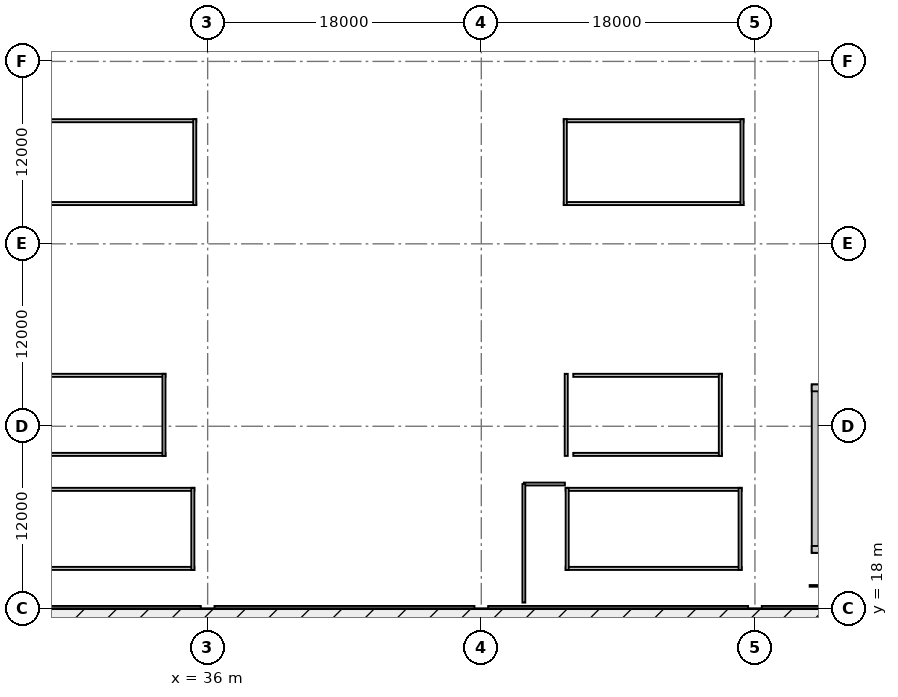
"""IFC4 building model, lengths in metres.
Left out: names, types, materials, properties, quantities, classifications, styles, units other than length and angle.
Written with IfcOpenShell. Run it as: python <this file> out.ifc"""

import sys

from ifc_helpers import new_model, si_unit, direction, frame, frame_2d, origin, origin_2d, place, context, subcontext, project, spatial, rectangle, circle, extrude, element, fill, save


model = new_model("IFC4")
c1 = context("Model", 3, precision=1e-05, world=origin(), true_north=direction((0.0, 1.0)))
c2 = subcontext(c1, "Body", "Model", "MODEL_VIEW")
j1 = project(units=[si_unit("LENGTHUNIT", "METRE"), si_unit("PLANEANGLEUNIT", "RADIAN")], contexts=[c1])
p1 = place(None, origin())
s1 = spatial("IfcSite", under=j1, at=p1, CompositionType="ELEMENT")
p2 = place(p1, origin())
s2 = spatial("IfcBuilding", under=s1, at=p2, CompositionType="ELEMENT")
p3 = place(p2, origin())
s3 = spatial("IfcBuildingStorey", under=s2, at=p3, CompositionType="ELEMENT", Elevation=0.0)
for number, where, z_axis, x_axis in (
    (1, (36.0, 18.0, 0.0), (0.0, 0.0, 1.0), (1.0, 0.0, 0.0)),
    (2, (36.0, 30.0, 0.0), (0.0, 0.0, 1.0), (1.0, 0.0, 0.0)),
    (3, (36.0, 36.0, 0.0), (0.0, 0.0, 1.0), (1.0, 0.0, 0.0)),
    (4, (36.0, 42.0, 0.0), (0.0, 0.0, 1.0), (1.0, 0.0, 0.0)),
    (5, (36.0, 54.0, 0.0), (0.0, 0.0, 1.0), (1.0, 0.0, 0.0)),
    (6, (54.0, 18.0, 0.0), (0.0, 0.0, 1.0), (1.0, 0.0, 0.0)),
    (7, (54.0, 30.0, 0.0), (0.0, 0.0, 1.0), (1.0, 0.0, 0.0)),
    (8, (54.0, 36.0, 0.0), (0.0, 0.0, 1.0), (1.0, 0.0, 0.0)),
    (9, (54.0, 42.0, 0.0), (0.0, 0.0, 1.0), (1.0, 0.0, 0.0)),
    (10, (54.0, 54.0, 0.0), (0.0, 0.0, 1.0), (1.0, 0.0, 0.0)),
    (11, (72.0, 18.0, 0.0), (0.0, 0.0, 1.0), (1.0, 0.0, 0.0)),
    (12, (72.0, 30.0, 0.0), (0.0, 0.0, 1.0), (1.0, 0.0, 0.0)),
    (13, (72.0, 36.0, 0.0), (0.0, 0.0, 1.0), (1.0, 0.0, 0.0)),
    (14, (72.0, 42.0, 0.0), (0.0, 0.0, 1.0), (1.0, 0.0, 0.0)),
    (15, (72.0, 54.0, 0.0), (0.0, 0.0, 1.0), (1.0, 0.0, 0.0)),
):
    element("IfcColumn", number, at=place(p3, frame(where, z_axis=z_axis, x_axis=x_axis)), inside=s3, PredefinedType="COLUMN", context=c2, shape_type="SweptSolid", body=[
        extrude(circle(Radius=0.45, at=origin_2d()), origin(), (0.0, 0.0, 1.0), 6.6),
    ])
p4 = place(p3, frame((35.55, 18.0, 0.0), z_axis=(0.0, 0.0, 1.0), x_axis=(-1.0, 0.0, 0.0)))
e16 = element("IfcWall", 16, at=p4, inside=s3, PredefinedType="SOLIDWALL", context=c2, shape_type="SweptSolid", body=[
    extrude(rectangle(XDim=17.1, YDim=0.36, at=frame_2d((8.55, 0.0))), origin(), (0.0, 0.0, 1.0), 5.595),
])
p5 = place(p4, frame((3.25, 0.0, 0.0)))
e17 = element("IfcOpeningElement", 17, at=p5, cuts=e16, PredefinedType="OPENING", context=c2, shape_type="SweptSolid", body=[
    extrude(rectangle(XDim=2.4, YDim=2.5, at=frame_2d((1.2, 1.25))), frame((0.0, 0.19, 0.0), z_axis=(0.0, -1.0, 0.0), x_axis=(1.0, 0.0, 0.0)), (0.0, 0.0, 1.0), 0.38),
])
p6 = place(p4, frame((7.35, 0.0, 0.0)))
e18 = element("IfcOpeningElement", 18, at=p6, cuts=e16, PredefinedType="OPENING", context=c2, shape_type="SweptSolid", body=[
    extrude(rectangle(XDim=2.4, YDim=2.5, at=frame_2d((1.2, 1.25))), frame((0.0, 0.19, 0.0), z_axis=(0.0, -1.0, 0.0), x_axis=(1.0, 0.0, 0.0)), (0.0, 0.0, 1.0), 0.38),
])
p7 = place(p4, frame((11.15, 0.0, 0.95)))
e19 = element("IfcOpeningElement", 19, at=p7, cuts=e16, PredefinedType="OPENING", context=c2, shape_type="SweptSolid", body=[
    extrude(rectangle(XDim=3.0, YDim=2.1, at=frame_2d((1.5, 1.05))), frame((0.0, 0.19, 0.0), z_axis=(0.0, -1.0, 0.0), x_axis=(1.0, 0.0, 0.0)), (0.0, 0.0, 1.0), 0.38),
])
p8 = place(p3, frame((53.55, 18.0, 0.0), z_axis=(0.0, 0.0, 1.0), x_axis=(-1.0, 0.0, 0.0)))
e20 = element("IfcWall", 20, at=p8, inside=s3, PredefinedType="SOLIDWALL", context=c2, shape_type="SweptSolid", body=[
    extrude(rectangle(XDim=17.1, YDim=0.36, at=frame_2d((8.55, 0.0))), origin(), (0.0, 0.0, 1.0), 5.595),
])
p9 = place(p8, frame((3.25, 0.0, 0.0)))
e21 = element("IfcOpeningElement", 21, at=p9, cuts=e20, PredefinedType="OPENING", context=c2, shape_type="SweptSolid", body=[
    extrude(rectangle(XDim=2.4, YDim=2.5, at=frame_2d((1.2, 1.25))), frame((0.0, 0.19, 0.0), z_axis=(0.0, -1.0, 0.0), x_axis=(1.0, 0.0, 0.0)), (0.0, 0.0, 1.0), 0.38),
])
p10 = place(p8, frame((7.45, 0.0, 0.0)))
e22 = element("IfcOpeningElement", 22, at=p10, cuts=e20, PredefinedType="OPENING", context=c2, shape_type="SweptSolid", body=[
    extrude(rectangle(XDim=2.2, YDim=2.45, at=frame_2d((1.1, 1.225))), frame((0.0, 0.19, 0.0), z_axis=(0.0, -1.0, 0.0), x_axis=(1.0, 0.0, 0.0)), (0.0, 0.0, 1.0), 0.38),
])
p11 = place(p8, frame((11.3, 0.0, 0.95)))
e23 = element("IfcOpeningElement", 23, at=p11, cuts=e20, PredefinedType="OPENING", context=c2, shape_type="SweptSolid", body=[
    extrude(rectangle(XDim=2.7, YDim=2.1, at=frame_2d((1.35, 1.05))), frame((0.0, 0.19, 0.0), z_axis=(0.0, -1.0, 0.0), x_axis=(1.0, 0.0, 0.0)), (0.0, 0.0, 1.0), 0.38),
])
p12 = place(p3, frame((71.55, 18.0, 0.0), z_axis=(0.0, 0.0, 1.0), x_axis=(-1.0, 0.0, 0.0)))
e24 = element("IfcWall", 24, at=p12, inside=s3, PredefinedType="SOLIDWALL", context=c2, shape_type="SweptSolid", body=[
    extrude(rectangle(XDim=17.1, YDim=0.36, at=frame_2d((8.55, 0.0))), origin(), (0.0, 0.0, 1.0), 5.595),
])
p13 = place(p12, frame((3.35, 0.0, 0.0)))
e25 = element("IfcOpeningElement", 25, at=p13, cuts=e24, PredefinedType="OPENING", context=c2, shape_type="SweptSolid", body=[
    extrude(rectangle(XDim=2.2, YDim=2.45, at=frame_2d((1.1, 1.225))), frame((0.0, 0.19, 0.0), z_axis=(0.0, -1.0, 0.0), x_axis=(1.0, 0.0, 0.0)), (0.0, 0.0, 1.0), 0.38),
])
p14 = place(p12, frame((7.55, 0.0, 0.0)))
e26 = element("IfcOpeningElement", 26, at=p14, cuts=e24, PredefinedType="OPENING", context=c2, shape_type="SweptSolid", body=[
    extrude(rectangle(XDim=2.0, YDim=2.4, at=frame_2d((1.0, 1.2))), frame((0.0, 0.19, 0.0), z_axis=(0.0, -1.0, 0.0), x_axis=(1.0, 0.0, 0.0)), (0.0, 0.0, 1.0), 0.38),
])
p15 = place(p12, frame((11.45, 0.0, 0.95)))
e27 = element("IfcOpeningElement", 27, at=p15, cuts=e24, PredefinedType="OPENING", context=c2, shape_type="SweptSolid", body=[
    extrude(rectangle(XDim=2.4, YDim=2.1, at=frame_2d((1.2, 1.05))), frame((0.0, 0.19, 0.0), z_axis=(0.0, -1.0, 0.0), x_axis=(1.0, 0.0, 0.0)), (0.0, 0.0, 1.0), 0.38),
])
p16 = place(p3, frame((89.55, 18.0, 0.0), z_axis=(0.0, 0.0, 1.0), x_axis=(-1.0, 0.0, 0.0)))
e28 = element("IfcWall", 28, at=p16, inside=s3, PredefinedType="SOLIDWALL", context=c2, shape_type="SweptSolid", body=[
    extrude(rectangle(XDim=17.1, YDim=0.36, at=frame_2d((8.55, 0.0))), origin(), (0.0, 0.0, 1.0), 5.595),
])
p17 = place(p16, frame((3.55, 0.0, 0.0)))
e29 = element("IfcOpeningElement", 29, at=p17, cuts=e28, PredefinedType="OPENING", context=c2, shape_type="SweptSolid", body=[
    extrude(rectangle(XDim=1.8, YDim=2.35, at=frame_2d((0.9, 1.175))), frame((0.0, 0.19, 0.0), z_axis=(0.0, -1.0, 0.0), x_axis=(1.0, 0.0, 0.0)), (0.0, 0.0, 1.0), 0.38),
])
p18 = place(p16, frame((7.35, 0.0, 0.0)))
e30 = element("IfcOpeningElement", 30, at=p18, cuts=e28, PredefinedType="OPENING", context=c2, shape_type="SweptSolid", body=[
    extrude(rectangle(XDim=2.4, YDim=2.5, at=frame_2d((1.2, 1.25))), frame((0.0, 0.19, 0.0), z_axis=(0.0, -1.0, 0.0), x_axis=(1.0, 0.0, 0.0)), (0.0, 0.0, 1.0), 0.38),
])
p19 = place(p16, frame((11.6, 0.0, 0.95)))
e31 = element("IfcOpeningElement", 31, at=p19, cuts=e28, PredefinedType="OPENING", context=c2, shape_type="SweptSolid", body=[
    extrude(rectangle(XDim=2.1, YDim=2.0, at=frame_2d((1.05, 1.0))), frame((0.0, 0.19, 0.0), z_axis=(0.0, -1.0, 0.0), x_axis=(1.0, 0.0, 0.0)), (0.0, 0.0, 1.0), 0.38),
])
p20 = place(p3, frame((75.962, 32.75, 0.0), z_axis=(0.0, 0.0, 1.0), x_axis=(0.0, -1.0, 0.0)))
e32 = element("IfcWall", 32, at=p20, inside=s3, PredefinedType="SHEAR", context=c2, shape_type="SweptSolid", body=[
    extrude(rectangle(XDim=11.075, YDim=0.45, at=frame_2d((5.538, 0.0))), origin(), (0.0, 0.0, 1.0), 6.32),
])
p21 = place(p3, frame((80.637, 32.525, 0.0), z_axis=(0.0, 0.0, 1.0), x_axis=(-1.0, 0.0, 0.0)))
e33 = element("IfcWall", 33, at=p21, inside=s3, PredefinedType="SHEAR", context=c2, shape_type="SweptSolid", body=[
    extrude(rectangle(XDim=4.9, YDim=0.45, at=frame_2d((2.45, 0.0))), origin(), (0.0, 0.0, 1.0), 6.32),
])
p22 = place(p3, frame((75.738, 21.9, 0.0), z_axis=(0.0, 0.0, 1.0), x_axis=(1.0, 0.0, 0.0)))
e34 = element("IfcWall", 34, at=p22, inside=s3, PredefinedType="SHEAR", context=c2, shape_type="SweptSolid", body=[
    extrude(rectangle(XDim=4.9, YDim=0.45, at=frame_2d((2.45, 0.0))), origin(), (0.0, 0.0, 1.0), 6.32),
])
p23 = place(p22, frame((1.1, 0.0, 0.0)))
e35 = element("IfcOpeningElement", 35, at=p23, cuts=e34, PredefinedType="OPENING", context=c2, shape_type="SweptSolid", body=[
    extrude(rectangle(XDim=1.3, YDim=2.1, at=frame_2d((0.65, 1.05))), frame((0.0, 0.235, 0.0), z_axis=(0.0, -1.0, 0.0), x_axis=(1.0, 0.0, 0.0)), (0.0, 0.0, 1.0), 0.47),
])
for number, where, z_axis, x_axis in (
    (36, (23.55, 20.65, 0.0), (0.0, 0.0, 1.0), (1.0, 0.0, 0.0)),
    (37, (35.125, 25.85, 0.0), (0.0, 0.0, 1.0), (-1.0, 0.0, 0.0)),
):
    element("IfcWall", number, at=place(p3, frame(where, z_axis=z_axis, x_axis=x_axis)), inside=s3, PredefinedType="SOLIDWALL", context=c2, shape_type="SweptSolid", body=[
        extrude(rectangle(XDim=11.575, YDim=0.2, at=frame_2d((5.788, 0.0))), origin(), (0.0, 0.0, 1.0), 6.32),
    ])
p24 = place(p3, frame((35.025, 20.55, 0.0), z_axis=(0.0, 0.0, 1.0), x_axis=(0.0, 1.0, 0.0)))
e38 = element("IfcWall", 38, at=p24, inside=s3, PredefinedType="SOLIDWALL", context=c2, shape_type="SweptSolid", body=[
    extrude(rectangle(XDim=5.4, YDim=0.2, at=frame_2d((2.7, 0.0))), origin(), (0.0, 0.0, 1.0), 6.32),
])
for number, where, z_axis, x_axis in (
    (39, (59.55, 20.65, 0.0), (0.0, 0.0, 1.0), (1.0, 0.0, 0.0)),
    (40, (71.125, 25.85, 0.0), (0.0, 0.0, 1.0), (-1.0, 0.0, 0.0)),
):
    element("IfcWall", number, at=place(p3, frame(where, z_axis=z_axis, x_axis=x_axis)), inside=s3, PredefinedType="SOLIDWALL", context=c2, shape_type="SweptSolid", body=[
        extrude(rectangle(XDim=11.575, YDim=0.2, at=frame_2d((5.788, 0.0))), origin(), (0.0, 0.0, 1.0), 6.32),
    ])
p25 = place(p3, frame((71.025, 20.55, 0.0), z_axis=(0.0, 0.0, 1.0), x_axis=(0.0, 1.0, 0.0)))
e41 = element("IfcWall", 41, at=p25, inside=s3, PredefinedType="SOLIDWALL", context=c2, shape_type="SweptSolid", body=[
    extrude(rectangle(XDim=5.4, YDim=0.2, at=frame_2d((2.7, 0.0))), origin(), (0.0, 0.0, 1.0), 6.32),
])
p26 = place(p3, frame((59.65, 25.95, 0.0), z_axis=(0.0, 0.0, 1.0), x_axis=(0.0, -1.0, 0.0)))
e42 = element("IfcWall", 42, at=p26, inside=s3, PredefinedType="SOLIDWALL", context=c2, shape_type="SweptSolid", body=[
    extrude(rectangle(XDim=5.4, YDim=0.2, at=frame_2d((2.7, 0.0))), origin(), (0.0, 0.0, 1.0), 4.4),
])
p27 = place(p26, frame((1.9, 0.0, 0.0)))
e43 = element("IfcOpeningElement", 43, at=p27, cuts=e42, PredefinedType="OPENING", context=c2, shape_type="SweptSolid", body=[
    extrude(rectangle(XDim=1.6, YDim=2.15, at=frame_2d((0.8, 1.075))), frame((0.0, 0.11, 0.0), z_axis=(0.0, -1.0, 0.0), x_axis=(1.0, 0.0, 0.0)), (0.0, 0.0, 1.0), 0.22),
])
for number, where, z_axis, x_axis in (
    (44, (23.425, 44.65, 0.0), (0.0, 0.0, 1.0), (1.0, 0.0, 0.0)),
    (45, (35.25, 50.1, 0.0), (0.0, 0.0, 1.0), (-1.0, 0.0, 0.0)),
):
    element("IfcWall", number, at=place(p3, frame(where, z_axis=z_axis, x_axis=x_axis)), inside=s3, PredefinedType="SOLIDWALL", context=c2, shape_type="SweptSolid", body=[
        extrude(rectangle(XDim=11.825, YDim=0.2, at=frame_2d((5.913, 0.0))), origin(), (0.0, 0.0, 1.0), 6.32),
    ])
p28 = place(p3, frame((35.15, 44.55, 0.0), z_axis=(0.0, 0.0, 1.0), x_axis=(0.0, 1.0, 0.0)))
e46 = element("IfcWall", 46, at=p28, inside=s3, PredefinedType="SOLIDWALL", context=c2, shape_type="SweptSolid", body=[
    extrude(rectangle(XDim=5.65, YDim=0.2, at=frame_2d((2.825, 0.0))), origin(), (0.0, 0.0, 1.0), 6.32),
])
for number, where, z_axis, x_axis in (
    (47, (59.425, 44.65, 0.0), (0.0, 0.0, 1.0), (1.0, 0.0, 0.0)),
    (48, (71.25, 50.1, 0.0), (0.0, 0.0, 1.0), (-1.0, 0.0, 0.0)),
):
    element("IfcWall", number, at=place(p3, frame(where, z_axis=z_axis, x_axis=x_axis)), inside=s3, PredefinedType="SOLIDWALL", context=c2, shape_type="SweptSolid", body=[
        extrude(rectangle(XDim=11.825, YDim=0.2, at=frame_2d((5.913, 0.0))), origin(), (0.0, 0.0, 1.0), 6.32),
    ])
p29 = place(p3, frame((71.15, 44.55, 0.0), z_axis=(0.0, 0.0, 1.0), x_axis=(0.0, 1.0, 0.0)))
e49 = element("IfcWall", 49, at=p29, inside=s3, PredefinedType="SOLIDWALL", context=c2, shape_type="SweptSolid", body=[
    extrude(rectangle(XDim=5.65, YDim=0.2, at=frame_2d((2.825, 0.0))), origin(), (0.0, 0.0, 1.0), 6.32),
])
p30 = place(p3, frame((59.525, 50.2, 0.0), z_axis=(0.0, 0.0, 1.0), x_axis=(0.0, -1.0, 0.0)))
e50 = element("IfcWall", 50, at=p30, inside=s3, PredefinedType="SOLIDWALL", context=c2, shape_type="SweptSolid", body=[
    extrude(rectangle(XDim=5.65, YDim=0.2, at=frame_2d((2.825, 0.0))), origin(), (0.0, 0.0, 1.0), 4.4),
])
p31 = place(p30, frame((2.025, 0.0, 0.0)))
e51 = element("IfcOpeningElement", 51, at=p31, cuts=e50, PredefinedType="OPENING", context=c2, shape_type="SweptSolid", body=[
    extrude(rectangle(XDim=1.6, YDim=2.15, at=frame_2d((0.8, 1.075))), frame((0.0, 0.11, 0.0), z_axis=(0.0, -1.0, 0.0), x_axis=(1.0, 0.0, 0.0)), (0.0, 0.0, 1.0), 0.22),
])
for number, where, z_axis, x_axis in (
    (52, (24.05, 28.15, 0.0), (0.0, 0.0, 1.0), (1.0, 0.0, 0.0)),
    (53, (33.225, 33.35, 0.0), (0.0, 0.0, 1.0), (-1.0, 0.0, 0.0)),
):
    element("IfcWall", number, at=place(p3, frame(where, z_axis=z_axis, x_axis=x_axis)), inside=s3, PredefinedType="SOLIDWALL", context=c2, shape_type="SweptSolid", body=[
        extrude(rectangle(XDim=9.175, YDim=0.2, at=frame_2d((4.587, 0.0))), origin(), (0.0, 0.0, 1.0), 6.32),
    ])
p32 = place(p3, frame((33.125, 28.05, 0.0), z_axis=(0.0, 0.0, 1.0), x_axis=(0.0, 1.0, 0.0)))
e54 = element("IfcWall", 54, at=p32, inside=s3, PredefinedType="SOLIDWALL", context=c2, shape_type="SweptSolid", body=[
    extrude(rectangle(XDim=5.4, YDim=0.2, at=frame_2d((2.7, 0.0))), origin(), (0.0, 0.0, 1.0), 6.32),
])
for number, where, z_axis, x_axis in (
    (55, (60.05, 28.15, 0.0), (0.0, 0.0, 1.0), (1.0, 0.0, 0.0)),
    (56, (69.825, 33.35, 0.0), (0.0, 0.0, 1.0), (-1.0, 0.0, 0.0)),
):
    element("IfcWall", number, at=place(p3, frame(where, z_axis=z_axis, x_axis=x_axis)), inside=s3, PredefinedType="SOLIDWALL", context=c2, shape_type="SweptSolid", body=[
        extrude(rectangle(XDim=9.775, YDim=0.2, at=frame_2d((4.887, 0.0))), origin(), (0.0, 0.0, 1.0), 6.32),
    ])
p33 = place(p3, frame((69.725, 28.05, 0.0), z_axis=(0.0, 0.0, 1.0), x_axis=(0.0, 1.0, 0.0)))
e57 = element("IfcWall", 57, at=p33, inside=s3, PredefinedType="SOLIDWALL", context=c2, shape_type="SweptSolid", body=[
    extrude(rectangle(XDim=5.4, YDim=0.2, at=frame_2d((2.7, 0.0))), origin(), (0.0, 0.0, 1.0), 6.32),
])
p34 = place(p3, frame((59.587, 33.45, 0.0), z_axis=(0.0, 0.0, 1.0), x_axis=(0.0, -1.0, 0.0)))
e58 = element("IfcWall", 58, at=p34, inside=s3, PredefinedType="SOLIDWALL", context=c2, shape_type="SweptSolid", body=[
    extrude(rectangle(XDim=5.4, YDim=0.2, at=frame_2d((2.7, 0.0))), origin(), (0.0, 0.0, 1.0), 4.4),
])
p35 = place(p34, frame((1.9, 0.0, 0.0)))
e59 = element("IfcOpeningElement", 59, at=p35, cuts=e58, PredefinedType="OPENING", context=c2, shape_type="SweptSolid", body=[
    extrude(rectangle(XDim=1.6, YDim=2.15, at=frame_2d((0.8, 1.075))), frame((0.0, 0.11, 0.0), z_axis=(0.0, -1.0, 0.0), x_axis=(1.0, 0.0, 0.0)), (0.0, 0.0, 1.0), 0.22),
])
p36 = place(p3, frame((75.6, 19.5, 0.0), z_axis=(0.0, 0.0, 1.0), x_axis=(1.0, 0.0, 0.0)))
e60 = element("IfcWall", 60, at=p36, inside=s3, PredefinedType="PARTITIONING", context=c2, shape_type="SweptSolid", body=[
    extrude(rectangle(XDim=13.8, YDim=0.11, at=frame_2d((6.9, 0.0))), origin(), (0.0, 0.0, 1.0), 4.4),
])
p37 = place(p3, frame((56.8, 26.2, 0.0), z_axis=(0.0, 0.0, 1.0), x_axis=(1.0, 0.0, 0.0)))
e61 = element("IfcWall", 61, at=p37, inside=s3, PredefinedType="PARTITIONING", context=c2, shape_type="SweptSolid", body=[
    extrude(rectangle(XDim=2.7, YDim=0.19, at=frame_2d((1.35, 0.0))), origin(), (0.0, 0.0, 1.0), 4.4),
])
p38 = place(p3, frame((56.8, 18.4, 0.0), z_axis=(0.0, 0.0, 1.0), x_axis=(0.0, 1.0, 0.0)))
e62 = element("IfcWall", 62, at=p38, inside=s3, PredefinedType="PARTITIONING", context=c2, shape_type="SweptSolid", body=[
    extrude(rectangle(XDim=7.8, YDim=0.19, at=frame_2d((3.9, 0.0))), origin(), (0.0, 0.0, 1.0), 4.4),
])
p39 = place(p38, frame((3.15, 0.0, 0.0)))
e63 = element("IfcOpeningElement", 63, at=p39, cuts=e62, PredefinedType="OPENING", context=c2, shape_type="SweptSolid", body=[
    extrude(rectangle(XDim=1.5, YDim=2.15, at=frame_2d((0.75, 1.075))), frame((0.0, 0.105, 0.0), z_axis=(0.0, -1.0, 0.0), x_axis=(1.0, 0.0, 0.0)), (0.0, 0.0, 1.0), 0.21),
])
p40 = place(p5, origin())
e64 = element("IfcDoor", 64, at=p40, inside=s3, OperationType="SINGLE_SWING_LEFT", PredefinedType="DOOR", context=c2, shape_type="SweptSolid", body=[
    extrude(rectangle(XDim=2.4, YDim=2.5, at=frame_2d((1.2, 1.25))), frame((0.0, 0.025, 0.0), z_axis=(0.0, -1.0, 0.0), x_axis=(1.0, 0.0, 0.0)), (0.0, 0.0, 1.0), 0.05),
])
fill(e17, e64)
p41 = place(p6, origin())
e65 = element("IfcDoor", 65, at=p41, inside=s3, OperationType="SINGLE_SWING_RIGHT", PredefinedType="DOOR", context=c2, shape_type="SweptSolid", body=[
    extrude(rectangle(XDim=2.4, YDim=2.5, at=frame_2d((1.2, 1.25))), frame((0.0, 0.025, 0.0), z_axis=(0.0, -1.0, 0.0), x_axis=(1.0, 0.0, 0.0)), (0.0, 0.0, 1.0), 0.05),
])
fill(e18, e65)
p42 = place(p9, origin())
e66 = element("IfcDoor", 66, at=p42, inside=s3, OperationType="SINGLE_SWING_LEFT", PredefinedType="DOOR", context=c2, shape_type="SweptSolid", body=[
    extrude(rectangle(XDim=2.4, YDim=2.5, at=frame_2d((1.2, 1.25))), frame((0.0, 0.025, 0.0), z_axis=(0.0, -1.0, 0.0), x_axis=(1.0, 0.0, 0.0)), (0.0, 0.0, 1.0), 0.05),
])
fill(e21, e66)
p43 = place(p10, origin())
e67 = element("IfcDoor", 67, at=p43, inside=s3, OperationType="SINGLE_SWING_RIGHT", PredefinedType="DOOR", context=c2, shape_type="SweptSolid", body=[
    extrude(rectangle(XDim=2.2, YDim=2.45, at=frame_2d((1.1, 1.225))), frame((0.0, 0.025, 0.0), z_axis=(0.0, -1.0, 0.0), x_axis=(1.0, 0.0, 0.0)), (0.0, 0.0, 1.0), 0.05),
])
fill(e22, e67)
p44 = place(p11, origin())
e68 = element("IfcWindow", 68, at=p44, inside=s3, PartitioningType="SINGLE_PANEL", PredefinedType="WINDOW", context=c2, shape_type="SweptSolid", body=[
    extrude(rectangle(XDim=2.7, YDim=2.1, at=frame_2d((1.35, 1.05))), frame((0.0, 0.03, 0.0), z_axis=(0.0, -1.0, 0.0), x_axis=(1.0, 0.0, 0.0)), (0.0, 0.0, 1.0), 0.06),
])
fill(e23, e68)
p45 = place(p13, origin())
e69 = element("IfcDoor", 69, at=p45, inside=s3, OperationType="SINGLE_SWING_LEFT", PredefinedType="DOOR", context=c2, shape_type="SweptSolid", body=[
    extrude(rectangle(XDim=2.2, YDim=2.45, at=frame_2d((1.1, 1.225))), frame((0.0, 0.025, 0.0), z_axis=(0.0, -1.0, 0.0), x_axis=(1.0, 0.0, 0.0)), (0.0, 0.0, 1.0), 0.05),
])
fill(e25, e69)
p46 = place(p14, origin())
e70 = element("IfcDoor", 70, at=p46, inside=s3, OperationType="SINGLE_SWING_RIGHT", PredefinedType="DOOR", context=c2, shape_type="SweptSolid", body=[
    extrude(rectangle(XDim=2.0, YDim=2.4, at=frame_2d((1.0, 1.2))), frame((0.0, 0.025, 0.0), z_axis=(0.0, -1.0, 0.0), x_axis=(1.0, 0.0, 0.0)), (0.0, 0.0, 1.0), 0.05),
])
fill(e26, e70)
p47 = place(p15, origin())
e71 = element("IfcWindow", 71, at=p47, inside=s3, PartitioningType="SINGLE_PANEL", PredefinedType="WINDOW", context=c2, shape_type="SweptSolid", body=[
    extrude(rectangle(XDim=2.4, YDim=2.1, at=frame_2d((1.2, 1.05))), frame((0.0, 0.03, 0.0), z_axis=(0.0, -1.0, 0.0), x_axis=(1.0, 0.0, 0.0)), (0.0, 0.0, 1.0), 0.06),
])
fill(e27, e71)
p48 = place(p19, origin())
e72 = element("IfcWindow", 72, at=p48, inside=s3, PartitioningType="SINGLE_PANEL", PredefinedType="WINDOW", context=c2, shape_type="SweptSolid", body=[
    extrude(rectangle(XDim=2.1, YDim=2.0, at=frame_2d((1.05, 1.0))), frame((0.0, 0.03, 0.0), z_axis=(0.0, -1.0, 0.0), x_axis=(1.0, 0.0, 0.0)), (0.0, 0.0, 1.0), 0.06),
])
fill(e31, e72)
p49 = place(p27, origin())
e73 = element("IfcDoor", 73, at=p49, inside=s3, OperationType="SINGLE_SWING_RIGHT", PredefinedType="DOOR", context=c2, shape_type="SweptSolid", body=[
    extrude(rectangle(XDim=1.6, YDim=2.15, at=frame_2d((0.8, 1.075))), frame((0.0, 0.025, 0.0), z_axis=(0.0, -1.0, 0.0), x_axis=(1.0, 0.0, 0.0)), (0.0, 0.0, 1.0), 0.05),
])
fill(e43, e73)
p50 = place(p31, origin())
e74 = element("IfcDoor", 74, at=p50, inside=s3, OperationType="SINGLE_SWING_RIGHT", PredefinedType="DOOR", context=c2, shape_type="SweptSolid", body=[
    extrude(rectangle(XDim=1.6, YDim=2.15, at=frame_2d((0.8, 1.075))), frame((0.0, 0.025, 0.0), z_axis=(0.0, -1.0, 0.0), x_axis=(1.0, 0.0, 0.0)), (0.0, 0.0, 1.0), 0.05),
])
fill(e51, e74)
p51 = place(p35, origin())
e75 = element("IfcDoor", 75, at=p51, inside=s3, OperationType="SINGLE_SWING_LEFT", PredefinedType="DOOR", context=c2, shape_type="SweptSolid", body=[
    extrude(rectangle(XDim=1.6, YDim=2.15, at=frame_2d((0.8, 1.075))), frame((0.0, 0.025, 0.0), z_axis=(0.0, -1.0, 0.0), x_axis=(1.0, 0.0, 0.0)), (0.0, 0.0, 1.0), 0.05),
])
fill(e59, e75)
p52 = place(p39, origin())
e76 = element("IfcDoor", 76, at=p52, inside=s3, OperationType="SINGLE_SWING_LEFT", PredefinedType="DOOR", context=c2, shape_type="SweptSolid", body=[
    extrude(rectangle(XDim=1.5, YDim=2.15, at=frame_2d((0.75, 1.075))), frame((0.0, 0.025, 0.0), z_axis=(0.0, -1.0, 0.0), x_axis=(1.0, 0.0, 0.0)), (0.0, 0.0, 1.0), 0.05),
])
fill(e63, e76)
save(model, sys.argv[1])
